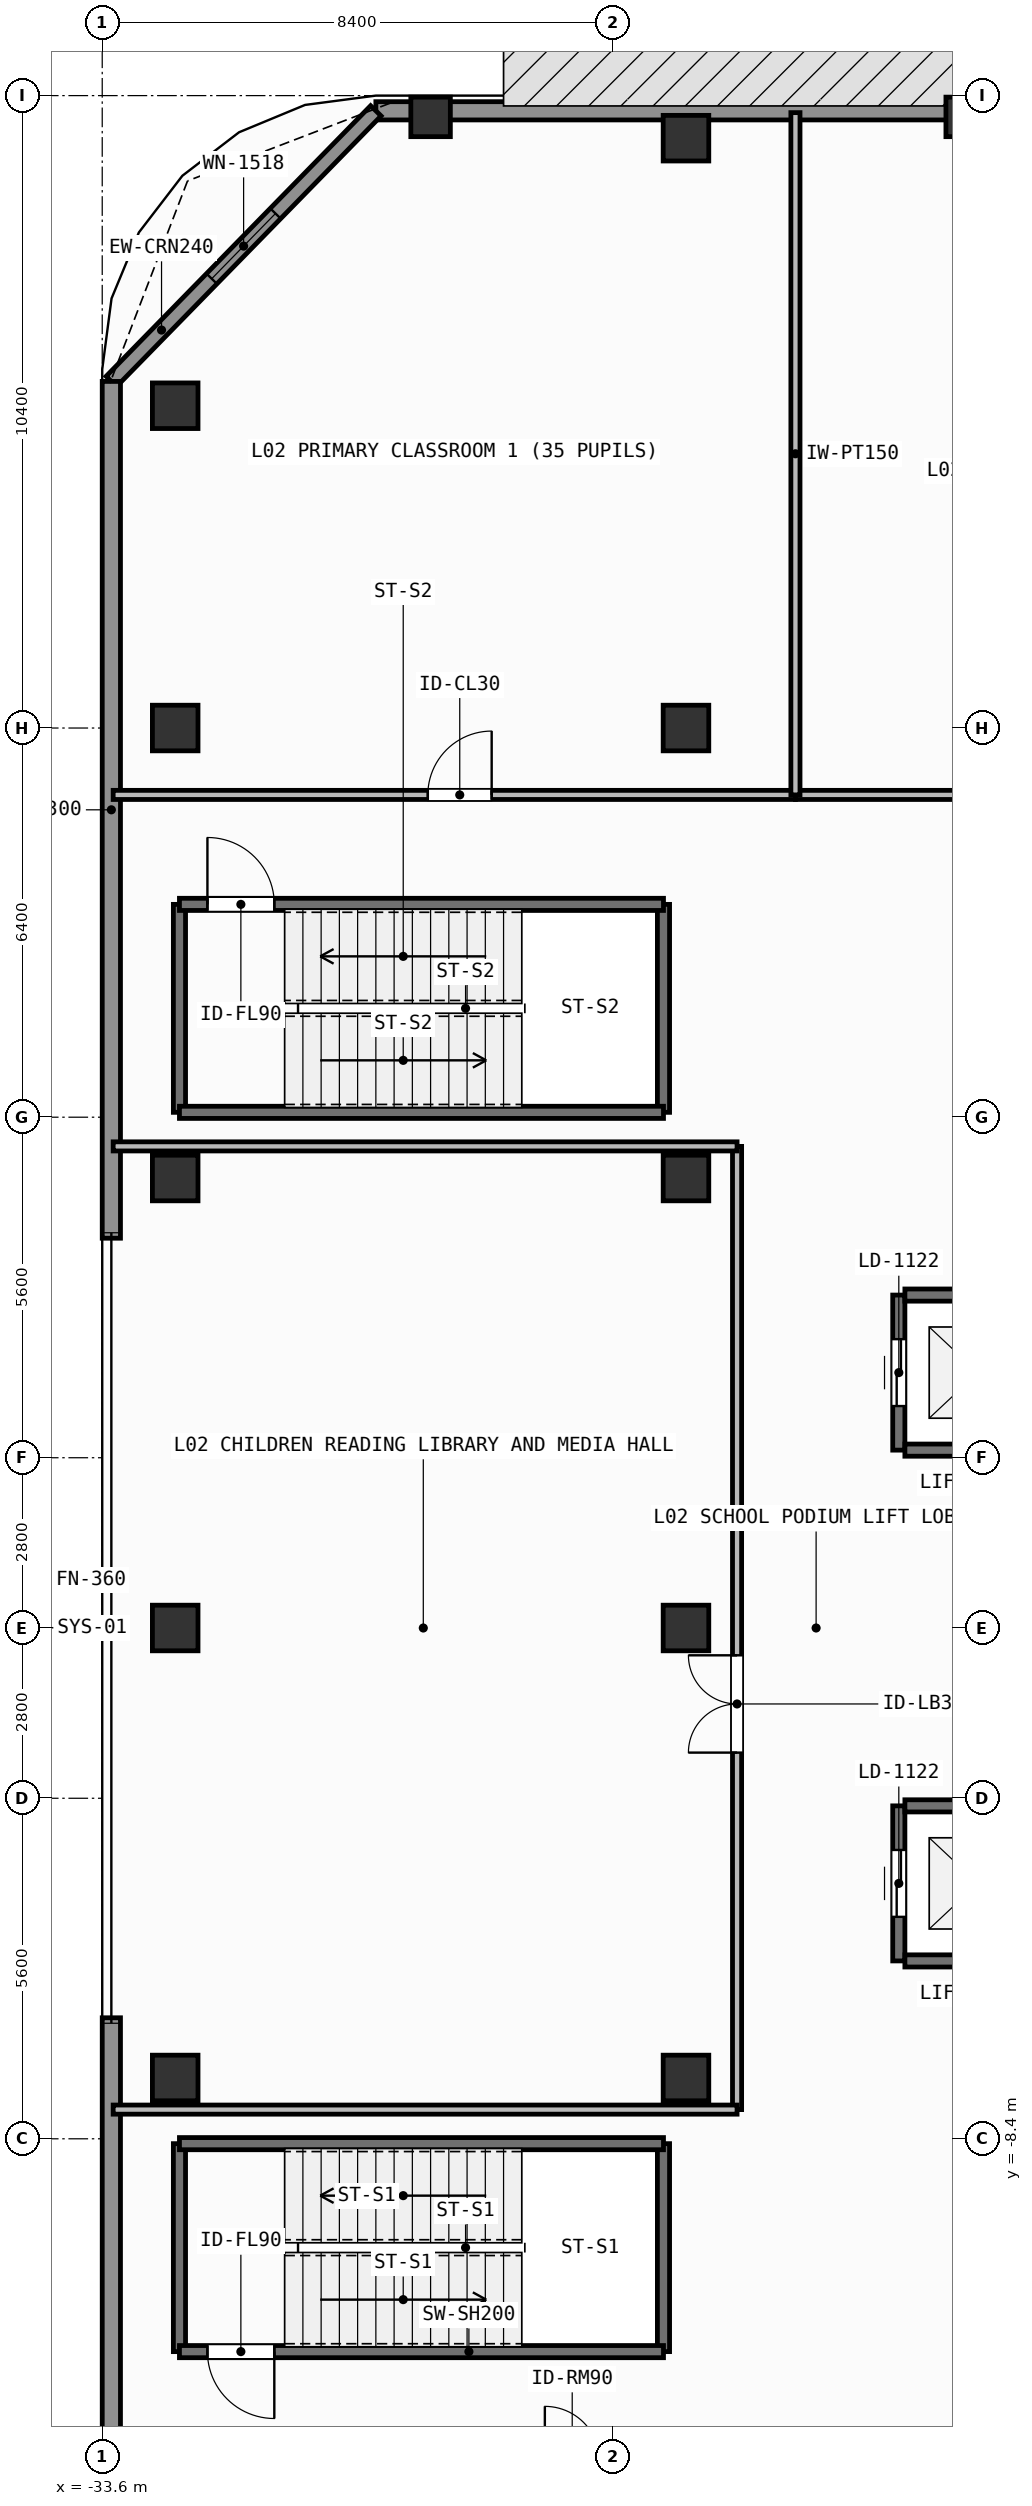
"""IFC4 building model, lengths in metres.
Left out: names, types, materials, properties, quantities, classifications, styles, units other than length and angle.
Written with IfcOpenShell. Run it as: python <this file> out.ifc"""

import sys

from ifc_helpers import new_model, si_unit, direction, frame, frame_2d, origin, origin_2d, place, context, subcontext, project, spatial, rectangle, extrude, element, fill, save


model = new_model("IFC4")
c1 = context("Model", 3, precision=1e-05, world=origin(), true_north=direction((0.0, 1.0)))
c2 = subcontext(c1, "Body", "Model", "MODEL_VIEW")
j1 = project(units=[si_unit("LENGTHUNIT", "METRE"), si_unit("PLANEANGLEUNIT", "RADIAN")], contexts=[c1])
p1 = place(None, origin())
s1 = spatial("IfcSite", under=j1, at=p1, CompositionType="ELEMENT")
p2 = place(p1, origin())
s2 = spatial("IfcBuilding", under=s1, at=p2, CompositionType="ELEMENT")
p3 = place(p2, frame((0.0, 0.0, 4.8)))
s3 = spatial("IfcBuildingStorey", under=s2, at=p3, CompositionType="ELEMENT", Elevation=4.8)
for number, where, z_axis, x_axis in (
    (1, (-32.4, -7.4, 0.0), (0.0, 0.0, 1.0), (1.0, 0.0, 0.0)),
    (2, (-32.4, 0.0, 0.0), (0.0, 0.0, 1.0), (1.0, 0.0, 0.0)),
    (3, (-32.4, 7.4, 0.0), (0.0, 0.0, 1.0), (1.0, 0.0, 0.0)),
    (4, (-32.4, 14.8, 0.0), (0.0, 0.0, 1.0), (1.0, 0.0, 0.0)),
    (5, (-24.0, -7.4, 0.0), (0.0, 0.0, 1.0), (1.0, 0.0, 0.0)),
    (6, (-24.0, 0.0, 0.0), (0.0, 0.0, 1.0), (1.0, 0.0, 0.0)),
    (7, (-24.0, 7.4, 0.0), (0.0, 0.0, 1.0), (1.0, 0.0, 0.0)),
    (8, (-24.0, 14.8, 0.0), (0.0, 0.0, 1.0), (1.0, 0.0, 0.0)),
    (9, (-24.0, 24.5, 0.0), (0.0, 0.0, 1.0), (1.0, 0.0, 0.0)),
    (10, (-32.4, 20.1, 0.0), (0.0, 0.0, 1.0), (1.0, 0.0, 0.0)),
):
    element("IfcColumn", number, at=place(p3, frame(where, z_axis=z_axis, x_axis=x_axis)), inside=s3, PredefinedType="COLUMN", context=c2, shape_type="SweptSolid", body=[
        extrude(rectangle(XDim=0.75, YDim=0.75, at=origin_2d()), origin(), (0.0, 0.0, 1.0), 4.2),
    ])
for number, where, z_axis, x_axis in (
    (11, (-28.2, 24.85, 0.0), (0.0, 0.0, 1.0), (1.0, 0.0, 0.0)),
    (12, (-19.4, 24.85, 0.0), (0.0, 0.0, 1.0), (1.0, 0.0, 0.0)),
):
    element("IfcColumn", number, at=place(p3, frame(where, z_axis=z_axis, x_axis=x_axis)), inside=s3, PredefinedType="PILASTER", context=c2, shape_type="SweptSolid", body=[
        extrude(rectangle(XDim=0.65, YDim=0.65, at=origin_2d()), origin(), (0.0, 0.0, 1.0), 4.2),
    ])
p4 = place(p3, frame((-29.1, 24.95, 0.0), z_axis=(0.0, 0.0, 1.0), x_axis=(1.0, 0.0, 0.0)))
e13 = element("IfcWall", 13, at=p4, inside=s3, PredefinedType="SOLIDWALL", context=c2, shape_type="SweptSolid", body=[
    extrude(rectangle(XDim=58.2, YDim=0.3, at=frame_2d((29.1, 0.0))), origin(), (0.0, 0.0, 1.0), 3.96),
])
p5 = place(p4, frame((24.35, 0.0, 0.85)))
e14 = element("IfcOpeningElement", 14, at=p5, cuts=e13, PredefinedType="OPENING", context=c2, shape_type="SweptSolid", body=[
    extrude(rectangle(XDim=2.1, YDim=2.2, at=frame_2d((1.05, 1.1))), frame((0.0, 0.16, 0.0), z_axis=(0.0, -1.0, 0.0), x_axis=(1.0, 0.0, 0.0)), (0.0, 0.0, 1.0), 0.32),
])
p6 = place(p4, frame((31.75, 0.0, 0.85)))
e15 = element("IfcOpeningElement", 15, at=p6, cuts=e13, PredefinedType="OPENING", context=c2, shape_type="SweptSolid", body=[
    extrude(rectangle(XDim=2.1, YDim=2.2, at=frame_2d((1.05, 1.1))), frame((0.0, 0.16, 0.0), z_axis=(0.0, -1.0, 0.0), x_axis=(1.0, 0.0, 0.0)), (0.0, 0.0, 1.0), 0.32),
])
p7 = place(p4, frame((40.625, 0.0, 0.85)))
e16 = element("IfcOpeningElement", 16, at=p7, cuts=e13, PredefinedType="OPENING", context=c2, shape_type="SweptSolid", body=[
    extrude(rectangle(XDim=2.1, YDim=2.2, at=frame_2d((1.05, 1.1))), frame((0.0, 0.16, 0.0), z_axis=(0.0, -1.0, 0.0), x_axis=(1.0, 0.0, 0.0)), (0.0, 0.0, 1.0), 0.32),
])
p8 = place(p4, frame((45.175, 0.0, 0.85)))
e17 = element("IfcOpeningElement", 17, at=p8, cuts=e13, PredefinedType="OPENING", context=c2, shape_type="SweptSolid", body=[
    extrude(rectangle(XDim=2.1, YDim=2.2, at=frame_2d((1.05, 1.1))), frame((0.0, 0.16, 0.0), z_axis=(0.0, -1.0, 0.0), x_axis=(1.0, 0.0, 0.0)), (0.0, 0.0, 1.0), 0.32),
])
p9 = place(p3, frame((-33.45, 20.5, 0.0), z_axis=(0.0, 0.0, 1.0), x_axis=(0.69901822973, 0.715103848756, 0.0)))
e18 = element("IfcWall", 18, at=p9, inside=s3, PredefinedType="SOLIDWALL", context=c2, shape_type="SweptSolid", body=[
    extrude(rectangle(XDim=6.223, YDim=0.24, at=frame_2d((3.111, 0.0))), origin(), (0.0, 0.0, 1.0), 3.96),
])
p10 = place(p9, frame((2.362, 0.0, 0.85)))
e19 = element("IfcOpeningElement", 19, at=p10, cuts=e18, PredefinedType="OPENING", context=c2, shape_type="SweptSolid", body=[
    extrude(rectangle(XDim=1.5, YDim=1.85, at=frame_2d((0.75, 0.925))), frame((0.0, 0.13, 0.0), z_axis=(0.0, -1.0, 0.0), x_axis=(1.0, 0.0, 0.0)), (0.0, 0.0, 1.0), 0.26),
])
for number, where, z_axis, x_axis in (
    (20, (-33.45, -20.5, 0.0), (0.0, 0.0, 1.0), (0.0, 1.0, 0.0)),
    (21, (-33.45, 6.41, 0.0), (0.0, 0.0, 1.0), (0.0, 1.0, 0.0)),
):
    element("IfcWall", number, at=place(p3, frame(where, z_axis=z_axis, x_axis=x_axis)), inside=s3, PredefinedType="SOLIDWALL", context=c2, shape_type="SweptSolid", body=[
        extrude(rectangle(XDim=14.09, YDim=0.3, at=frame_2d((7.045, 0.0))), origin(), (0.0, 0.0, 1.0), 3.96),
    ])
p11 = place(p3, frame((-20.5, -5.475, 0.0), z_axis=(0.0, 0.0, 1.0), x_axis=(0.0, 1.0, 0.0)))
e22 = element("IfcWall", 22, at=p11, inside=s3, PredefinedType="SHEAR", context=c2, shape_type="SweptSolid", body=[
    extrude(rectangle(XDim=2.55, YDim=0.2, at=frame_2d((1.275, 0.0))), origin(), (0.0, 0.0, 1.0), 3.96),
])
p12 = place(p11, frame((0.725, 0.0, 0.0)))
e23 = element("IfcOpeningElement", 23, at=p12, cuts=e22, PredefinedType="OPENING", context=c2, shape_type="SweptSolid", body=[
    extrude(rectangle(XDim=1.1, YDim=2.2, at=frame_2d((0.55, 1.1))), frame((0.0, 0.11, 0.0), z_axis=(0.0, -1.0, 0.0), x_axis=(1.0, 0.0, 0.0)), (0.0, 0.0, 1.0), 0.22),
])
for number, where, z_axis, x_axis in (
    (24, (-20.4, -5.475, 0.0), (0.0, 0.0, 1.0), (1.0, 0.0, 0.0)),
    (25, (-20.4, -2.925, 0.0), (0.0, 0.0, 1.0), (1.0, 0.0, 0.0)),
):
    element("IfcWall", number, at=place(p3, frame(where, z_axis=z_axis, x_axis=x_axis)), inside=s3, PredefinedType="SHEAR", context=c2, shape_type="SweptSolid", body=[
        extrude(rectangle(XDim=2.4, YDim=0.2, at=frame_2d((1.2, 0.0))), origin(), (0.0, 0.0, 1.0), 3.96),
    ])
p13 = place(p3, frame((-20.5, 2.925, 0.0), z_axis=(0.0, 0.0, 1.0), x_axis=(0.0, 1.0, 0.0)))
e26 = element("IfcWall", 26, at=p13, inside=s3, PredefinedType="SHEAR", context=c2, shape_type="SweptSolid", body=[
    extrude(rectangle(XDim=2.55, YDim=0.2, at=frame_2d((1.275, 0.0))), origin(), (0.0, 0.0, 1.0), 3.96),
])
p14 = place(p13, frame((0.725, 0.0, 0.0)))
e27 = element("IfcOpeningElement", 27, at=p14, cuts=e26, PredefinedType="OPENING", context=c2, shape_type="SweptSolid", body=[
    extrude(rectangle(XDim=1.1, YDim=2.2, at=frame_2d((0.55, 1.1))), frame((0.0, 0.11, 0.0), z_axis=(0.0, -1.0, 0.0), x_axis=(1.0, 0.0, 0.0)), (0.0, 0.0, 1.0), 0.22),
])
for number, where, z_axis, x_axis in (
    (28, (-20.4, 2.925, 0.0), (0.0, 0.0, 1.0), (1.0, 0.0, 0.0)),
    (29, (-20.4, 5.475, 0.0), (0.0, 0.0, 1.0), (1.0, 0.0, 0.0)),
):
    element("IfcWall", number, at=place(p3, frame(where, z_axis=z_axis, x_axis=x_axis)), inside=s3, PredefinedType="SHEAR", context=c2, shape_type="SweptSolid", body=[
        extrude(rectangle(XDim=2.4, YDim=0.2, at=frame_2d((1.2, 0.0))), origin(), (0.0, 0.0, 1.0), 3.96),
    ])
for number, where, z_axis, x_axis in (
    (30, (-32.33, -11.9, 0.0), (0.0, 0.0, 1.0), (0.0, 1.0, 0.0)),
    (31, (-24.37, -8.48, 0.0), (0.0, 0.0, 1.0), (0.0, -1.0, 0.0)),
):
    element("IfcWall", number, at=place(p3, frame(where, z_axis=z_axis, x_axis=x_axis)), inside=s3, PredefinedType="SHEAR", context=c2, shape_type="SweptSolid", body=[
        extrude(rectangle(XDim=3.42, YDim=0.2, at=frame_2d((1.71, 0.0))), origin(), (0.0, 0.0, 1.0), 3.96),
    ])
p15 = place(p3, frame((-24.37, -11.9, 0.0), z_axis=(0.0, 0.0, 1.0), x_axis=(-1.0, 0.0, 0.0)))
e32 = element("IfcWall", 32, at=p15, inside=s3, PredefinedType="SHEAR", context=c2, shape_type="SweptSolid", body=[
    extrude(rectangle(XDim=7.96, YDim=0.2, at=frame_2d((3.98, 0.0))), origin(), (0.0, 0.0, 1.0), 3.96),
])
p16 = place(p15, frame((6.4, 0.0, 0.0)))
e33 = element("IfcOpeningElement", 33, at=p16, cuts=e32, PredefinedType="OPENING", context=c2, shape_type="SweptSolid", body=[
    extrude(rectangle(XDim=1.1, YDim=2.15, at=frame_2d((0.55, 1.075))), frame((0.0, 0.11, 0.0), z_axis=(0.0, -1.0, 0.0), x_axis=(1.0, 0.0, 0.0)), (0.0, 0.0, 1.0), 0.22),
])
p17 = place(p3, frame((-32.33, -8.48, 0.0), z_axis=(0.0, 0.0, 1.0), x_axis=(1.0, 0.0, 0.0)))
e34 = element("IfcWall", 34, at=p17, inside=s3, PredefinedType="SHEAR", context=c2, shape_type="SweptSolid", body=[
    extrude(rectangle(XDim=7.96, YDim=0.2, at=frame_2d((3.98, 0.0))), origin(), (0.0, 0.0, 1.0), 3.96),
])
for number, where, z_axis, x_axis in (
    (35, (-32.33, 8.48, 0.0), (0.0, 0.0, 1.0), (0.0, 1.0, 0.0)),
    (36, (-24.37, 11.9, 0.0), (0.0, 0.0, 1.0), (0.0, -1.0, 0.0)),
):
    element("IfcWall", number, at=place(p3, frame(where, z_axis=z_axis, x_axis=x_axis)), inside=s3, PredefinedType="SHEAR", context=c2, shape_type="SweptSolid", body=[
        extrude(rectangle(XDim=3.42, YDim=0.2, at=frame_2d((1.71, 0.0))), origin(), (0.0, 0.0, 1.0), 3.96),
    ])
p18 = place(p3, frame((-24.37, 8.48, 0.0), z_axis=(0.0, 0.0, 1.0), x_axis=(-1.0, 0.0, 0.0)))
e37 = element("IfcWall", 37, at=p18, inside=s3, PredefinedType="SHEAR", context=c2, shape_type="SweptSolid", body=[
    extrude(rectangle(XDim=7.96, YDim=0.2, at=frame_2d((3.98, 0.0))), origin(), (0.0, 0.0, 1.0), 3.96),
])
p19 = place(p3, frame((-32.33, 11.9, 0.0), z_axis=(0.0, 0.0, 1.0), x_axis=(1.0, 0.0, 0.0)))
e38 = element("IfcWall", 38, at=p19, inside=s3, PredefinedType="SHEAR", context=c2, shape_type="SweptSolid", body=[
    extrude(rectangle(XDim=7.96, YDim=0.2, at=frame_2d((3.98, 0.0))), origin(), (0.0, 0.0, 1.0), 3.96),
])
p20 = place(p19, frame((0.46, 0.0, 0.0)))
e39 = element("IfcOpeningElement", 39, at=p20, cuts=e38, PredefinedType="OPENING", context=c2, shape_type="SweptSolid", body=[
    extrude(rectangle(XDim=1.1, YDim=2.15, at=frame_2d((0.55, 1.075))), frame((0.0, 0.11, 0.0), z_axis=(0.0, -1.0, 0.0), x_axis=(1.0, 0.0, 0.0)), (0.0, 0.0, 1.0), 0.22),
])
p21 = place(p3, frame((-33.42, 13.7, 0.0), z_axis=(0.0, 0.0, 1.0), x_axis=(1.0, 0.0, 0.0)))
e40 = element("IfcWall", 40, at=p21, inside=s3, PredefinedType="PARTITIONING", context=c2, shape_type="SweptSolid", body=[
    extrude(rectangle(XDim=11.22, YDim=0.15, at=frame_2d((5.61, 0.0))), origin(), (0.0, 0.0, 1.0), 3.96),
])
p22 = place(p21, frame((5.175, 0.0, 0.0)))
e41 = element("IfcOpeningElement", 41, at=p22, cuts=e40, PredefinedType="OPENING", context=c2, shape_type="SweptSolid", body=[
    extrude(rectangle(XDim=1.05, YDim=2.2, at=frame_2d((0.525, 1.1))), frame((0.0, 0.085, 0.0), z_axis=(0.0, -1.0, 0.0), x_axis=(1.0, 0.0, 0.0)), (0.0, 0.0, 1.0), 0.17),
])
p23 = place(p3, frame((-22.2, 13.7, 0.0), z_axis=(0.0, 0.0, 1.0), x_axis=(1.0, 0.0, 0.0)))
e42 = element("IfcWall", 42, at=p23, inside=s3, PredefinedType="PARTITIONING", context=c2, shape_type="SweptSolid", body=[
    extrude(rectangle(XDim=11.0, YDim=0.15, at=frame_2d((5.5, 0.0))), origin(), (0.0, 0.0, 1.0), 3.96),
])
p24 = place(p23, frame((4.975, 0.0, 0.0)))
e43 = element("IfcOpeningElement", 43, at=p24, cuts=e42, PredefinedType="OPENING", context=c2, shape_type="SweptSolid", body=[
    extrude(rectangle(XDim=1.05, YDim=2.2, at=frame_2d((0.525, 1.1))), frame((0.0, 0.085, 0.0), z_axis=(0.0, -1.0, 0.0), x_axis=(1.0, 0.0, 0.0)), (0.0, 0.0, 1.0), 0.17),
])
p25 = place(p3, frame((-23.16, -7.92, 0.0), z_axis=(0.0, 0.0, 1.0), x_axis=(0.0, 1.0, 0.0)))
e44 = element("IfcWall", 44, at=p25, inside=s3, PredefinedType="PARTITIONING", context=c2, shape_type="SweptSolid", body=[
    extrude(rectangle(XDim=15.84, YDim=0.15, at=frame_2d((7.92, 0.0))), origin(), (0.0, 0.0, 1.0), 3.96),
])
p26 = place(p25, frame((5.871, 0.0, 0.0)))
e45 = element("IfcOpeningElement", 45, at=p26, cuts=e44, PredefinedType="OPENING", context=c2, shape_type="SweptSolid", body=[
    extrude(rectangle(XDim=1.6, YDim=2.3, at=frame_2d((0.8, 1.15))), frame((0.0, 0.085, 0.0), z_axis=(0.0, -1.0, 0.0), x_axis=(1.0, 0.0, 0.0)), (0.0, 0.0, 1.0), 0.17),
])
p27 = place(p3, frame((-22.2, 13.7, 0.0), z_axis=(0.0, 0.0, 1.0), x_axis=(0.0, 1.0, 0.0)))
e46 = element("IfcWall", 46, at=p27, inside=s3, PredefinedType="PARTITIONING", context=c2, shape_type="SweptSolid", body=[
    extrude(rectangle(XDim=11.22, YDim=0.15, at=frame_2d((5.61, 0.0))), origin(), (0.0, 0.0, 1.0), 3.96),
])
for number, where, z_axis, x_axis in (
    (47, (-33.42, -7.92, 0.0), (0.0, 0.0, 1.0), (1.0, 0.0, 0.0)),
    (48, (-33.42, 7.92, 0.0), (0.0, 0.0, 1.0), (1.0, 0.0, 0.0)),
):
    element("IfcWall", number, at=place(p3, frame(where, z_axis=z_axis, x_axis=x_axis)), inside=s3, PredefinedType="PARTITIONING", context=c2, shape_type="SweptSolid", body=[
        extrude(rectangle(XDim=10.26, YDim=0.15, at=frame_2d((5.13, 0.0))), origin(), (0.0, 0.0, 1.0), 3.96),
    ])
p28 = place(p10, origin())
e49 = element("IfcWindow", 49, at=p28, inside=s3, PartitioningType="SINGLE_PANEL", PredefinedType="WINDOW", context=c2, shape_type="SweptSolid", body=[
    extrude(rectangle(XDim=1.5, YDim=1.85, at=frame_2d((0.75, 0.925))), frame((0.0, 0.03, 0.0), z_axis=(0.0, -1.0, 0.0), x_axis=(1.0, 0.0, 0.0)), (0.0, 0.0, 1.0), 0.06),
])
fill(e19, e49)
p29 = place(p12, origin())
e50 = element("IfcDoor", 50, at=p29, inside=s3, OperationType="SLIDING_TO_LEFT", PredefinedType="DOOR", context=c2, shape_type="SweptSolid", body=[
    extrude(rectangle(XDim=1.1, YDim=2.2, at=frame_2d((0.55, 1.1))), frame((0.0, 0.025, 0.0), z_axis=(0.0, -1.0, 0.0), x_axis=(1.0, 0.0, 0.0)), (0.0, 0.0, 1.0), 0.05),
])
fill(e23, e50)
p30 = place(p14, origin())
e51 = element("IfcDoor", 51, at=p30, inside=s3, OperationType="SLIDING_TO_LEFT", PredefinedType="DOOR", context=c2, shape_type="SweptSolid", body=[
    extrude(rectangle(XDim=1.1, YDim=2.2, at=frame_2d((0.55, 1.1))), frame((0.0, 0.025, 0.0), z_axis=(0.0, -1.0, 0.0), x_axis=(1.0, 0.0, 0.0)), (0.0, 0.0, 1.0), 0.05),
])
fill(e27, e51)
p31 = place(p16, origin())
e52 = element("IfcDoor", 52, at=p31, inside=s3, OperationType="SINGLE_SWING_LEFT", PredefinedType="DOOR", context=c2, shape_type="SweptSolid", body=[
    extrude(rectangle(XDim=1.1, YDim=2.15, at=frame_2d((0.55, 1.075))), frame((0.0, 0.025, 0.0), z_axis=(0.0, -1.0, 0.0), x_axis=(1.0, 0.0, 0.0)), (0.0, 0.0, 1.0), 0.05),
])
fill(e33, e52)
p32 = place(p20, origin())
e53 = element("IfcDoor", 53, at=p32, inside=s3, OperationType="SINGLE_SWING_LEFT", PredefinedType="DOOR", context=c2, shape_type="SweptSolid", body=[
    extrude(rectangle(XDim=1.1, YDim=2.15, at=frame_2d((0.55, 1.075))), frame((0.0, 0.025, 0.0), z_axis=(0.0, -1.0, 0.0), x_axis=(1.0, 0.0, 0.0)), (0.0, 0.0, 1.0), 0.05),
])
fill(e39, e53)
p33 = place(p22, origin())
e54 = element("IfcDoor", 54, at=p33, inside=s3, OperationType="SINGLE_SWING_RIGHT", PredefinedType="DOOR", context=c2, shape_type="SweptSolid", body=[
    extrude(rectangle(XDim=1.05, YDim=2.2, at=frame_2d((0.525, 1.1))), frame((0.0, 0.025, 0.0), z_axis=(0.0, -1.0, 0.0), x_axis=(1.0, 0.0, 0.0)), (0.0, 0.0, 1.0), 0.05),
])
fill(e41, e54)
p34 = place(p26, origin())
e55 = element("IfcDoor", 55, at=p34, inside=s3, OperationType="SINGLE_SWING_LEFT", PredefinedType="DOOR", context=c2, shape_type="SweptSolid", body=[
    extrude(rectangle(XDim=1.6, YDim=2.3, at=frame_2d((0.8, 1.15))), frame((0.0, 0.025, 0.0), z_axis=(0.0, -1.0, 0.0), x_axis=(1.0, 0.0, 0.0)), (0.0, 0.0, 1.0), 0.05),
])
fill(e45, e55)
save(model, sys.argv[1])
